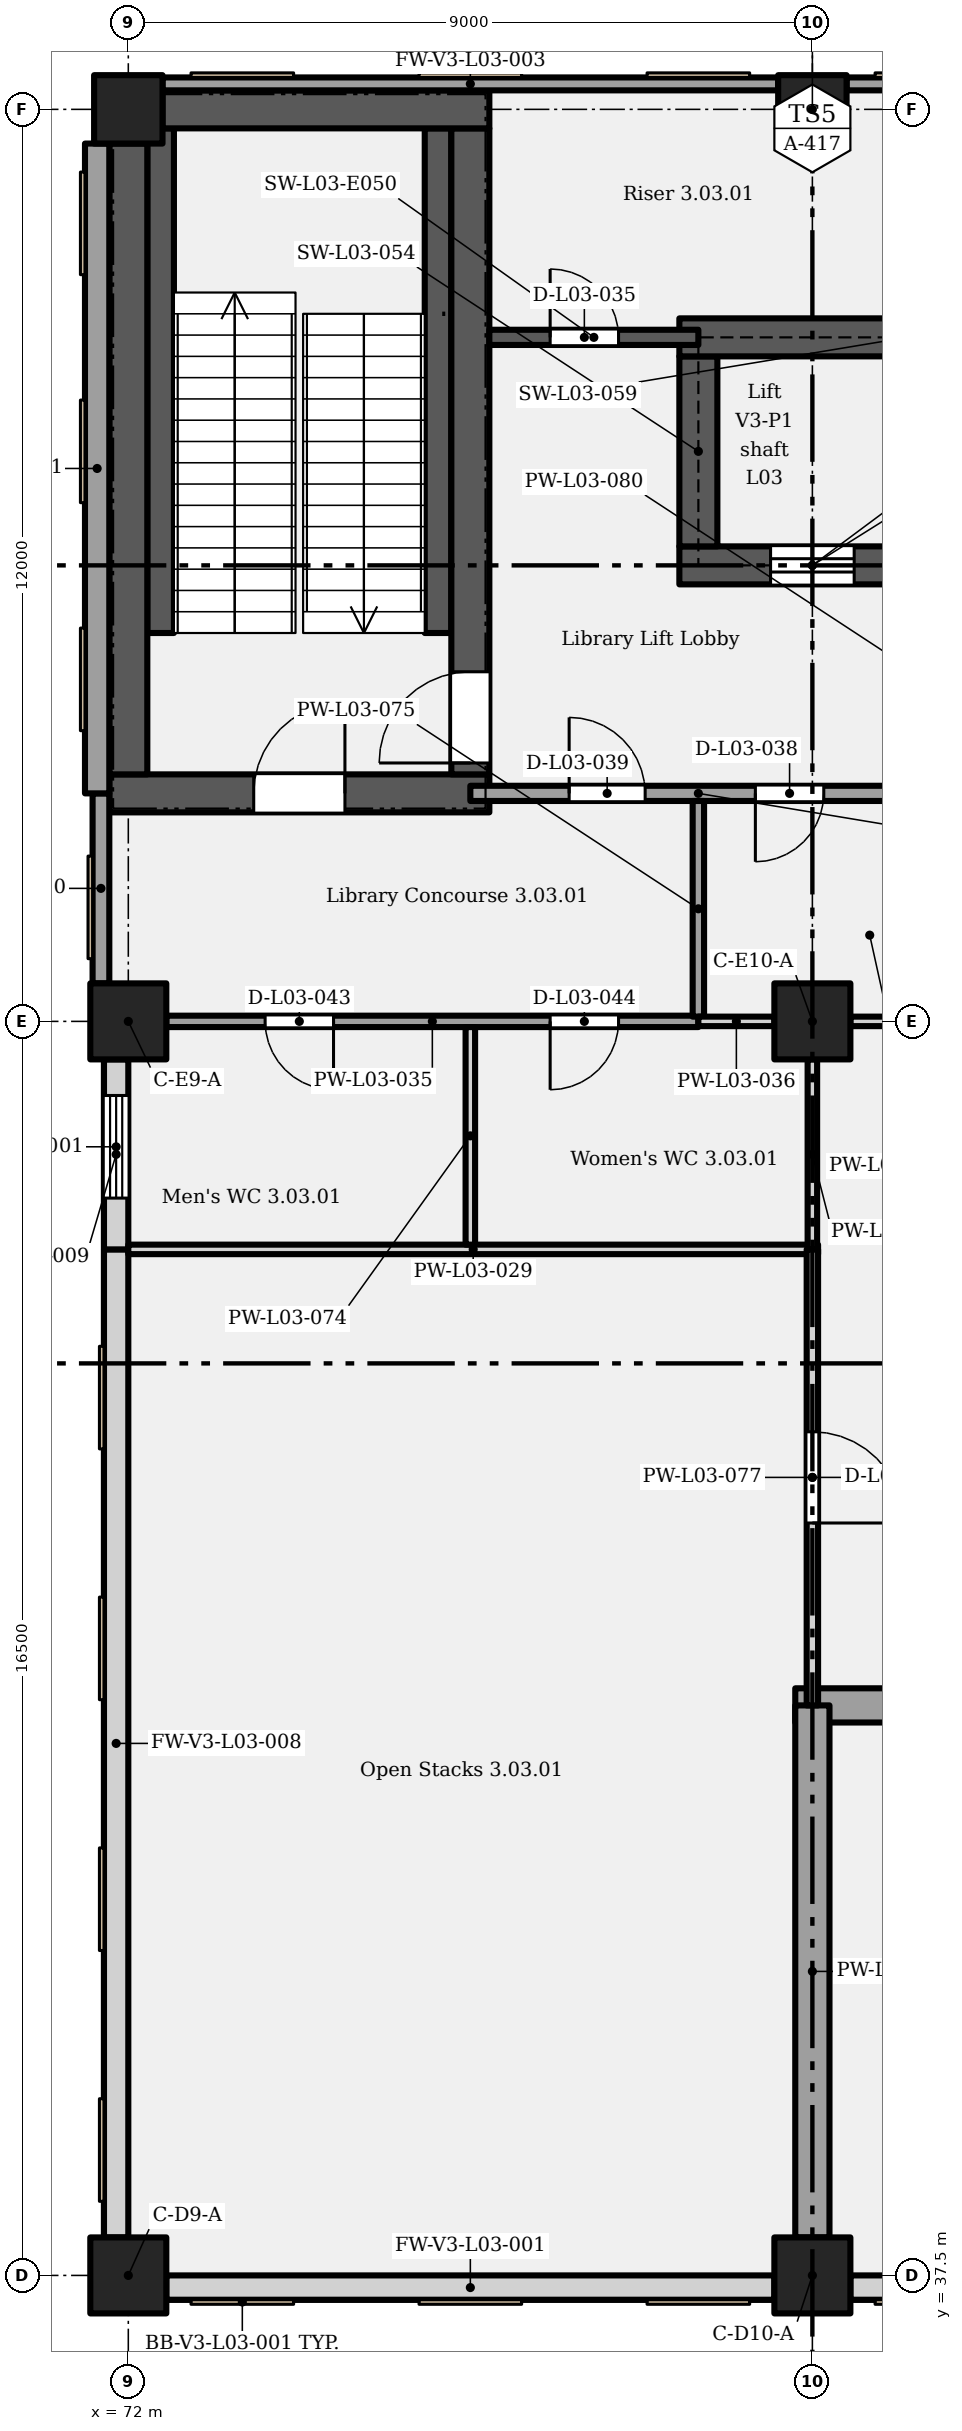
"""IFC4 building model, lengths in metres.
Left out: names, types, materials, properties, quantities, classifications, styles, units other than length and angle.
Written with IfcOpenShell. Run it as: python <this file> out.ifc"""

import sys

from ifc_helpers import new_model, si_unit, direction, frame, frame_2d, origin, origin_2d, place, context, subcontext, project, spatial, rectangle, extrude, element, fill, save


model = new_model("IFC4")
c1 = context("Model", 3, precision=1e-05, world=origin(), true_north=direction((0.0, 1.0)))
c2 = subcontext(c1, "Body", "Model", "MODEL_VIEW")
j1 = project(units=[si_unit("LENGTHUNIT", "METRE"), si_unit("PLANEANGLEUNIT", "RADIAN")], contexts=[c1])
p1 = place(None, origin())
s1 = spatial("IfcSite", under=j1, at=p1, CompositionType="ELEMENT")
p2 = place(p1, origin())
s2 = spatial("IfcBuilding", under=s1, at=p2, CompositionType="ELEMENT")
p3 = place(p2, frame((0.0, 0.0, 17.4)))
s3 = spatial("IfcBuildingStorey", under=s2, at=p3, CompositionType="ELEMENT", Elevation=17.4)
for number, where, z_axis, x_axis in (
    (1, (72.0, 37.5, 0.0), (0.0, 0.0, 1.0), (1.0, 0.0, 0.0)),
    (2, (81.0, 37.5, 0.0), (0.0, 0.0, 1.0), (1.0, 0.0, 0.0)),
    (3, (72.0, 54.0, 0.0), (0.0, 0.0, 1.0), (1.0, 0.0, 0.0)),
    (4, (81.0, 54.0, 0.0), (0.0, 0.0, 1.0), (1.0, 0.0, 0.0)),
):
    element("IfcColumn", number, at=place(p3, frame(where, z_axis=z_axis, x_axis=x_axis)), inside=s3, PredefinedType="COLUMN", context=c2, shape_type="SweptSolid", body=[
        extrude(rectangle(XDim=1.0, YDim=1.0, at=origin_2d()), origin(), (0.0, 0.0, 1.0), 5.4),
    ])
for number, where, z_axis, x_axis in (
    (5, (72.0, 66.0, 0.0), (0.0, 0.0, 1.0), (1.0, 0.0, 0.0)),
    (6, (81.0, 66.0, 0.0), (0.0, 0.0, 1.0), (1.0, 0.0, 0.0)),
):
    element("IfcColumn", number, at=place(p3, frame(where, z_axis=z_axis, x_axis=x_axis)), inside=s3, PredefinedType="COLUMN", context=c2, shape_type="SweptSolid", body=[
        extrude(rectangle(XDim=0.9, YDim=0.9, at=origin_2d()), origin(), (0.0, 0.0, 1.0), 5.4),
    ])
p4 = place(p3, frame((71.75, 57.0, 0.0), z_axis=(0.0, 0.0, 1.0), x_axis=(1.0, 0.0, 0.0)))
e7 = element("IfcWall", 7, at=p4, inside=s3, PredefinedType="SHEAR", context=c2, shape_type="SweptSolid", body=[
    extrude(rectangle(XDim=5.0, YDim=0.5, at=frame_2d((2.5, 0.0))), origin(), (0.0, 0.0, 1.0), 5.15),
])
p5 = place(p4, frame((1.9, 0.0, 0.0)))
e8 = element("IfcOpeningElement", 8, at=p5, cuts=e7, PredefinedType="OPENING", context=c2, shape_type="SweptSolid", body=[
    extrude(rectangle(XDim=1.2, YDim=2.1, at=frame_2d((0.6, 1.05))), frame((0.0, 0.26, 0.0), z_axis=(0.0, -1.0, 0.0), x_axis=(1.0, 0.0, 0.0)), (0.0, 0.0, 1.0), 0.52),
])
p6 = place(p3, frame((72.0, 57.25, 0.0), z_axis=(0.0, 0.0, 1.0), x_axis=(0.0, 1.0, 0.0)))
e9 = element("IfcWall", 9, at=p6, inside=s3, PredefinedType="SHEAR", context=c2, shape_type="SweptSolid", body=[
    extrude(rectangle(XDim=8.3, YDim=0.5, at=frame_2d((4.15, 0.0))), origin(), (0.0, 0.0, 1.0), 5.15),
])
p7 = place(p3, frame((76.5, 57.25, 0.0), z_axis=(0.0, 0.0, 1.0), x_axis=(0.0, 1.0, 0.0)))
e10 = element("IfcWall", 10, at=p7, inside=s3, PredefinedType="SHEAR", context=c2, shape_type="SweptSolid", body=[
    extrude(rectangle(XDim=8.5, YDim=0.5, at=frame_2d((4.25, 0.0))), origin(), (0.0, 0.0, 1.0), 5.15),
])
p8 = place(p7, frame((0.15, 0.0, 0.0)))
e11 = element("IfcOpeningElement", 11, at=p8, cuts=e10, PredefinedType="OPENING", context=c2, shape_type="SweptSolid", body=[
    extrude(rectangle(XDim=1.2, YDim=2.1, at=frame_2d((0.6, 1.05))), frame((0.0, 0.26, 0.0), z_axis=(0.0, -1.0, 0.0), x_axis=(1.0, 0.0, 0.0)), (0.0, 0.0, 1.0), 0.52),
])
p9 = place(p3, frame((79.25, 60.0, 0.0), z_axis=(0.0, 0.0, 1.0), x_axis=(1.0, 0.0, 0.0)))
e12 = element("IfcWall", 12, at=p9, inside=s3, PredefinedType="SHEAR", context=c2, shape_type="SweptSolid", body=[
    extrude(rectangle(XDim=3.5, YDim=0.5, at=frame_2d((1.75, 0.0))), origin(), (0.0, 0.0, 1.0), 5.15),
])
p10 = place(p9, frame((1.2, 0.0, 0.0)))
e13 = element("IfcOpeningElement", 13, at=p10, cuts=e12, PredefinedType="OPENING", context=c2, shape_type="SweptSolid", body=[
    extrude(rectangle(XDim=1.1, YDim=2.1, at=frame_2d((0.55, 1.05))), frame((0.0, 0.26, 0.0), z_axis=(0.0, -1.0, 0.0), x_axis=(1.0, 0.0, 0.0)), (0.0, 0.0, 1.0), 0.52),
])
p11 = place(p3, frame((79.5, 60.25, 0.0), z_axis=(0.0, 0.0, 1.0), x_axis=(0.0, 1.0, 0.0)))
e14 = element("IfcWall", 14, at=p11, inside=s3, PredefinedType="SHEAR", context=c2, shape_type="SweptSolid", body=[
    extrude(rectangle(XDim=2.5, YDim=0.5, at=frame_2d((1.25, 0.0))), origin(), (0.0, 0.0, 1.0), 5.15),
])
p12 = place(p3, frame((79.25, 63.0, 0.0), z_axis=(0.0, 0.0, 1.0), x_axis=(1.0, 0.0, 0.0)))
e15 = element("IfcWall", 15, at=p12, inside=s3, PredefinedType="SHEAR", context=c2, shape_type="SweptSolid", body=[
    extrude(rectangle(XDim=6.0, YDim=0.5, at=frame_2d((3.0, 0.0))), origin(), (0.0, 0.0, 1.0), 5.15),
])
p13 = place(p12, frame((4.2, 0.0, 0.0)))
e16 = element("IfcOpeningElement", 16, at=p13, cuts=e15, PredefinedType="OPENING", context=c2, shape_type="SweptSolid", body=[
    extrude(rectangle(XDim=1.1, YDim=2.1, at=frame_2d((0.55, 1.05))), frame((0.0, 0.26, 0.0), z_axis=(0.0, -1.0, 0.0), x_axis=(1.0, 0.0, 0.0)), (0.0, 0.0, 1.0), 0.52),
])
p14 = place(p3, frame((72.45, 66.0, 0.0), z_axis=(0.0, 0.0, 1.0), x_axis=(1.0, 0.0, 0.0)))
e17 = element("IfcWall", 17, at=p14, inside=s3, PredefinedType="SHEAR", context=c2, shape_type="SweptSolid", body=[
    extrude(rectangle(XDim=4.3, YDim=0.5, at=frame_2d((2.15, 0.0))), origin(), (0.0, 0.0, 1.0), 5.15),
])
p15 = place(p3, frame((72.5, 37.34, 0.0), z_axis=(0.0, 0.0, 1.0), x_axis=(1.0, 0.0, 0.0)))
e18 = element("IfcWall", 18, at=p15, inside=s3, PredefinedType="SOLIDWALL", context=c2, shape_type="SweptSolid", body=[
    extrude(rectangle(XDim=8.0, YDim=0.32, at=frame_2d((4.0, 0.0))), origin(), (0.0, 0.0, 1.0), 5.15),
])
p16 = place(p3, frame((81.5, 37.34, 0.0), z_axis=(0.0, 0.0, 1.0), x_axis=(1.0, 0.0, 0.0)))
e19 = element("IfcWall", 19, at=p16, inside=s3, PredefinedType="SOLIDWALL", context=c2, shape_type="SweptSolid", body=[
    extrude(rectangle(XDim=8.05, YDim=0.32, at=frame_2d((4.025, 0.0))), origin(), (0.0, 0.0, 1.0), 5.15),
])
for number, where, z_axis, x_axis in (
    (20, (72.45, 66.335, 0.0), (0.0, 0.0, 1.0), (1.0, 0.0, 0.0)),
    (21, (81.45, 66.335, 0.0), (0.0, 0.0, 1.0), (1.0, 0.0, 0.0)),
):
    element("IfcWall", number, at=place(p3, frame(where, z_axis=z_axis, x_axis=x_axis)), inside=s3, PredefinedType="SOLIDWALL", context=c2, shape_type="SweptSolid", body=[
        extrude(rectangle(XDim=8.1, YDim=0.17, at=frame_2d((4.05, 0.0))), origin(), (0.0, 0.0, 1.0), 5.15),
    ])
p17 = place(p3, frame((71.84, 38.0, 0.0), z_axis=(0.0, 0.0, 1.0), x_axis=(0.0, 1.0, 0.0)))
e22 = element("IfcWall", 22, at=p17, inside=s3, PredefinedType="SOLIDWALL", context=c2, shape_type="SweptSolid", body=[
    extrude(rectangle(XDim=13.0, YDim=0.32, at=frame_2d((6.5, 0.0))), origin(), (0.0, 0.0, 1.0), 5.15),
])
p18 = place(p3, frame((71.84, 51.0, 0.0), z_axis=(0.0, 0.0, 1.0), x_axis=(0.0, 1.0, 0.0)))
e23 = element("IfcWall", 23, at=p18, inside=s3, PredefinedType="SOLIDWALL", context=c2, shape_type="SweptSolid", body=[
    extrude(rectangle(XDim=2.5, YDim=0.32, at=frame_2d((1.25, 0.0))), origin(), (0.0, 0.0, 1.0), 5.15),
])
p19 = place(p18, frame((0.675, 0.0, 1.2)))
e24 = element("IfcOpeningElement", 24, at=p19, cuts=e23, PredefinedType="OPENING", context=c2, shape_type="SweptSolid", body=[
    extrude(rectangle(XDim=1.35, YDim=2.55, at=frame_2d((0.675, 1.275))), frame((0.0, 0.17, 0.0), z_axis=(0.0, -1.0, 0.0), x_axis=(1.0, 0.0, 0.0)), (0.0, 0.0, 1.0), 0.34),
])
p20 = place(p3, frame((71.64, 54.5, 0.0), z_axis=(0.0, 0.0, 1.0), x_axis=(0.0, 1.0, 0.0)))
e25 = element("IfcWall", 25, at=p20, inside=s3, PredefinedType="SOLIDWALL", context=c2, shape_type="SweptSolid", body=[
    extrude(rectangle(XDim=2.5, YDim=0.22, at=frame_2d((1.25, 0.0))), origin(), (0.0, 0.0, 1.0), 5.15),
])
p21 = place(p3, frame((71.59, 57.0, 0.0), z_axis=(0.0, 0.0, 1.0), x_axis=(0.0, 1.0, 0.0)))
e26 = element("IfcWall", 26, at=p21, inside=s3, PredefinedType="SOLIDWALL", context=c2, shape_type="SweptSolid", body=[
    extrude(rectangle(XDim=8.55, YDim=0.32, at=frame_2d((4.275, 0.0))), origin(), (0.0, 0.0, 1.0), 5.15),
])
p22 = place(p3, frame((80.775, 45.0, 0.0), z_axis=(0.0, 0.0, 1.0), x_axis=(1.0, 0.0, 0.0)))
e27 = element("IfcWall", 27, at=p22, inside=s3, PredefinedType="PARTITIONING", context=c2, shape_type="SweptSolid", body=[
    extrude(rectangle(XDim=9.225, YDim=0.45, at=frame_2d((4.613, 0.0))), origin(), (0.0, 0.0, 1.0), 5.15),
])
p23 = place(p22, frame((4.125, 0.0, 0.0)))
e28 = element("IfcOpeningElement", 28, at=p23, cuts=e27, PredefinedType="OPENING", context=c2, shape_type="SweptSolid", body=[
    extrude(rectangle(XDim=1.2, YDim=2.4, at=frame_2d((0.6, 1.2))), frame((0.0, 0.235, 0.0), z_axis=(0.0, -1.0, 0.0), x_axis=(1.0, 0.0, 0.0)), (0.0, 0.0, 1.0), 0.47),
])
p24 = place(p3, frame((72.0, 51.0, 0.0), z_axis=(0.0, 0.0, 1.0), x_axis=(1.0, 0.0, 0.0)))
e29 = element("IfcWall", 29, at=p24, inside=s3, PredefinedType="PARTITIONING", context=c2, shape_type="SweptSolid", body=[
    extrude(rectangle(XDim=9.075, YDim=0.125, at=frame_2d((4.538, 0.0))), origin(), (0.0, 0.0, 1.0), 5.15),
])
p25 = place(p3, frame((72.5, 54.0, 0.0), z_axis=(0.0, 0.0, 1.0), x_axis=(1.0, 0.0, 0.0)))
e30 = element("IfcWall", 30, at=p25, inside=s3, PredefinedType="PARTITIONING", context=c2, shape_type="SweptSolid", body=[
    extrude(rectangle(XDim=7.0, YDim=0.15, at=frame_2d((3.5, 0.0))), origin(), (0.0, 0.0, 1.0), 4.4),
])
p26 = place(p25, frame((2.2, 0.0, 0.0), z_axis=(0.0, 0.0, 1.0), x_axis=(-1.0, 0.0, 0.0)))
e31 = element("IfcOpeningElement", 31, at=p26, cuts=e30, PredefinedType="OPENING", context=c2, shape_type="SweptSolid", body=[
    extrude(rectangle(XDim=0.9, YDim=2.1, at=frame_2d((0.45, 1.05))), frame((0.0, 0.085, 0.0), z_axis=(0.0, -1.0, 0.0), x_axis=(1.0, 0.0, 0.0)), (0.0, 0.0, 1.0), 0.17),
])
p27 = place(p25, frame((5.95, 0.0, 0.0), z_axis=(0.0, 0.0, 1.0), x_axis=(-1.0, 0.0, 0.0)))
e32 = element("IfcOpeningElement", 32, at=p27, cuts=e30, PredefinedType="OPENING", context=c2, shape_type="SweptSolid", body=[
    extrude(rectangle(XDim=0.9, YDim=2.1, at=frame_2d((0.45, 1.05))), frame((0.0, 0.085, 0.0), z_axis=(0.0, -1.0, 0.0), x_axis=(1.0, 0.0, 0.0)), (0.0, 0.0, 1.0), 0.17),
])
for number, where, z_axis, x_axis in (
    (33, (79.5, 54.0, 0.0), (0.0, 0.0, 1.0), (1.0, 0.0, 0.0)),
    (34, (81.5, 54.0, 0.0), (0.0, 0.0, 1.0), (1.0, 0.0, 0.0)),
):
    element("IfcWall", number, at=place(p3, frame(where, z_axis=z_axis, x_axis=x_axis)), inside=s3, PredefinedType="PARTITIONING", context=c2, shape_type="SweptSolid", body=[
        extrude(rectangle(XDim=1.0, YDim=0.125, at=frame_2d((0.5, 0.0))), origin(), (0.0, 0.0, 1.0), 4.4),
    ])
p28 = place(p3, frame((76.5, 57.0, 0.0), z_axis=(0.0, 0.0, 1.0), x_axis=(1.0, 0.0, 0.0)))
e35 = element("IfcWall", 35, at=p28, inside=s3, PredefinedType="PARTITIONING", context=c2, shape_type="SweptSolid", body=[
    extrude(rectangle(XDim=6.0, YDim=0.2, at=frame_2d((3.0, 0.0))), origin(), (0.0, 0.0, 1.0), 5.15),
])
p29 = place(p28, frame((4.65, 0.0, 0.0), z_axis=(0.0, 0.0, 1.0), x_axis=(-1.0, 0.0, 0.0)))
e36 = element("IfcOpeningElement", 36, at=p29, cuts=e35, PredefinedType="OPENING", context=c2, shape_type="SweptSolid", body=[
    extrude(rectangle(XDim=0.9, YDim=2.1, at=frame_2d((0.45, 1.05))), frame((0.0, 0.11, 0.0), z_axis=(0.0, -1.0, 0.0), x_axis=(1.0, 0.0, 0.0)), (0.0, 0.0, 1.0), 0.22),
])
p30 = place(p28, frame((1.3, 0.0, 0.0)))
e37 = element("IfcOpeningElement", 37, at=p30, cuts=e35, PredefinedType="OPENING", context=c2, shape_type="SweptSolid", body=[
    extrude(rectangle(XDim=1.0, YDim=2.1, at=frame_2d((0.5, 1.05))), frame((0.0, 0.11, 0.0), z_axis=(0.0, -1.0, 0.0), x_axis=(1.0, 0.0, 0.0)), (0.0, 0.0, 1.0), 0.22),
])
p31 = place(p3, frame((76.75, 63.0, 0.0), z_axis=(0.0, 0.0, 1.0), x_axis=(1.0, 0.0, 0.0)))
e38 = element("IfcWall", 38, at=p31, inside=s3, PredefinedType="SHEAR", context=c2, shape_type="SweptSolid", body=[
    extrude(rectangle(XDim=2.75, YDim=0.2, at=frame_2d((1.375, 0.0))), origin(), (0.0, 0.0, 1.0), 5.15),
])
p32 = place(p31, frame((0.8, 0.0, 0.0)))
e39 = element("IfcOpeningElement", 39, at=p32, cuts=e38, PredefinedType="OPENING", context=c2, shape_type="SweptSolid", body=[
    extrude(rectangle(XDim=0.9, YDim=2.0, at=frame_2d((0.45, 1.0))), frame((0.0, 0.11, 0.0), z_axis=(0.0, -1.0, 0.0), x_axis=(1.0, 0.0, 0.0)), (0.0, 0.0, 1.0), 0.22),
])
p33 = place(p3, frame((76.5, 51.062, 0.0), z_axis=(0.0, 0.0, 1.0), x_axis=(0.0, 1.0, 0.0)))
e40 = element("IfcWall", 40, at=p33, inside=s3, PredefinedType="PARTITIONING", context=c2, shape_type="SweptSolid", body=[
    extrude(rectangle(XDim=2.863, YDim=0.125, at=frame_2d((1.431, 0.0))), origin(), (0.0, 0.0, 1.0), 5.15),
])
p34 = place(p3, frame((79.5, 54.062, 0.0), z_axis=(0.0, 0.0, 1.0), x_axis=(0.0, 1.0, 0.0)))
e41 = element("IfcWall", 41, at=p34, inside=s3, PredefinedType="PARTITIONING", context=c2, shape_type="SweptSolid", body=[
    extrude(rectangle(XDim=2.837, YDim=0.15, at=frame_2d((1.419, 0.0))), origin(), (0.0, 0.0, 1.0), 5.15),
])
p35 = place(p3, frame((81.0, 38.0, 0.0), z_axis=(0.0, 0.0, 1.0), x_axis=(0.0, 1.0, 0.0)))
e42 = element("IfcWall", 42, at=p35, inside=s3, PredefinedType="PARTITIONING", context=c2, shape_type="SweptSolid", body=[
    extrude(rectangle(XDim=7.0, YDim=0.45, at=frame_2d((3.5, 0.0))), origin(), (0.0, 0.0, 1.0), 4.2),
])
p36 = place(p3, frame((81.0, 45.0, 0.0), z_axis=(0.0, 0.0, 1.0), x_axis=(0.0, 1.0, 0.0)))
e43 = element("IfcWall", 43, at=p36, inside=s3, PredefinedType="PARTITIONING", context=c2, shape_type="SweptSolid", body=[
    extrude(rectangle(XDim=6.0, YDim=0.15, at=frame_2d((3.0, 0.0))), origin(), (0.0, 0.0, 1.0), 4.2),
])
p37 = place(p36, frame((3.6, 0.0, 0.0), z_axis=(0.0, 0.0, 1.0), x_axis=(-1.0, 0.0, 0.0)))
e44 = element("IfcOpeningElement", 44, at=p37, cuts=e43, PredefinedType="OPENING", context=c2, shape_type="SweptSolid", body=[
    extrude(rectangle(XDim=1.2, YDim=2.4, at=frame_2d((0.6, 1.2))), frame((0.0, 0.085, 0.0), z_axis=(0.0, -1.0, 0.0), x_axis=(1.0, 0.0, 0.0)), (0.0, 0.0, 1.0), 0.17),
])
p38 = place(p3, frame((81.0, 51.0, 0.0), z_axis=(0.0, 0.0, 1.0), x_axis=(0.0, 1.0, 0.0)))
e45 = element("IfcWall", 45, at=p38, inside=s3, PredefinedType="PARTITIONING", context=c2, shape_type="SweptSolid", body=[
    extrude(rectangle(XDim=2.5, YDim=0.125, at=frame_2d((1.25, 0.0))), origin(), (0.0, 0.0, 1.0), 4.2),
])
p39 = place(p3, frame((72.425, 59.11, 0.0), z_axis=(0.0, 0.0, 1.0), x_axis=(0.0, 1.0, 0.0)))
e46 = element("IfcWall", 46, at=p39, inside=s3, PredefinedType="SHEAR", context=c2, shape_type="SweptSolid", body=[
    extrude(rectangle(XDim=6.64, YDim=0.35, at=frame_2d((3.32, 0.0))), origin(), (0.0, 0.0, 1.0), 5.15),
])
p40 = place(p3, frame((76.075, 59.11, 0.0), z_axis=(0.0, 0.0, 1.0), x_axis=(0.0, 1.0, 0.0)))
e47 = element("IfcWall", 47, at=p40, inside=s3, PredefinedType="SHEAR", context=c2, shape_type="SweptSolid", body=[
    extrude(rectangle(XDim=6.64, YDim=0.35, at=frame_2d((3.32, 0.0))), origin(), (0.0, 0.0, 1.0), 2.587),
])
p41 = place(p19, origin())
e48 = element("IfcWindow", 48, at=p41, inside=s3, PartitioningType="SINGLE_PANEL", PredefinedType="WINDOW", context=c2, shape_type="SweptSolid", body=[
    extrude(rectangle(XDim=1.35, YDim=2.55, at=frame_2d((0.675, 1.275))), frame((0.0, 0.03, 0.0), z_axis=(0.0, -1.0, 0.0), x_axis=(1.0, 0.0, 0.0)), (0.0, 0.0, 1.0), 0.06),
])
fill(e24, e48)
p42 = place(p8, origin())
e49 = element("IfcDoor", 49, at=p42, inside=s3, OperationType="SINGLE_SWING_LEFT", PredefinedType="DOOR", context=c2, shape_type="SweptSolid", body=[
    extrude(rectangle(XDim=1.2, YDim=2.1, at=frame_2d((0.6, 1.05))), frame((0.0, 0.025, 0.0), z_axis=(0.0, -1.0, 0.0), x_axis=(1.0, 0.0, 0.0)), (0.0, 0.0, 1.0), 0.05),
])
fill(e11, e49)
p43 = place(p10, origin())
e50 = element("IfcDoor", 50, at=p43, inside=s3, OperationType="SLIDING_TO_LEFT", PredefinedType="DOOR", context=c2, shape_type="SweptSolid", body=[
    extrude(rectangle(XDim=1.1, YDim=2.1, at=frame_2d((0.55, 1.05))), frame((0.0, 0.025, 0.0), z_axis=(0.0, -1.0, 0.0), x_axis=(1.0, 0.0, 0.0)), (0.0, 0.0, 1.0), 0.05),
])
fill(e13, e50)
p44 = place(p32, origin())
e51 = element("IfcDoor", 51, at=p44, inside=s3, OperationType="SINGLE_SWING_LEFT", PredefinedType="DOOR", context=c2, shape_type="SweptSolid", body=[
    extrude(rectangle(XDim=0.9, YDim=2.0, at=frame_2d((0.45, 1.0))), frame((0.0, 0.025, 0.0), z_axis=(0.0, -1.0, 0.0), x_axis=(1.0, 0.0, 0.0)), (0.0, 0.0, 1.0), 0.05),
])
fill(e39, e51)
p45 = place(p29, origin())
e52 = element("IfcDoor", 52, at=p45, inside=s3, OperationType="SINGLE_SWING_RIGHT", PredefinedType="DOOR", context=c2, shape_type="SweptSolid", body=[
    extrude(rectangle(XDim=0.9, YDim=2.1, at=frame_2d((0.45, 1.05))), frame((0.0, 0.025, 0.0), z_axis=(0.0, -1.0, 0.0), x_axis=(1.0, 0.0, 0.0)), (0.0, 0.0, 1.0), 0.05),
])
fill(e36, e52)
p46 = place(p30, origin())
e53 = element("IfcDoor", 53, at=p46, inside=s3, OperationType="SINGLE_SWING_LEFT", PredefinedType="DOOR", context=c2, shape_type="SweptSolid", body=[
    extrude(rectangle(XDim=1.0, YDim=2.1, at=frame_2d((0.5, 1.05))), frame((0.0, 0.025, 0.0), z_axis=(0.0, -1.0, 0.0), x_axis=(1.0, 0.0, 0.0)), (0.0, 0.0, 1.0), 0.05),
])
fill(e37, e53)
p47 = place(p5, origin())
e54 = element("IfcDoor", 54, at=p47, inside=s3, OperationType="SINGLE_SWING_RIGHT", PredefinedType="DOOR", context=c2, shape_type="SweptSolid", body=[
    extrude(rectangle(XDim=1.2, YDim=2.1, at=frame_2d((0.6, 1.05))), frame((0.0, 0.025, 0.0), z_axis=(0.0, -1.0, 0.0), x_axis=(1.0, 0.0, 0.0)), (0.0, 0.0, 1.0), 0.05),
])
fill(e8, e54)
p48 = place(p26, origin())
e55 = element("IfcDoor", 55, at=p48, inside=s3, OperationType="SINGLE_SWING_LEFT", PredefinedType="DOOR", context=c2, shape_type="SweptSolid", body=[
    extrude(rectangle(XDim=0.9, YDim=2.1, at=frame_2d((0.45, 1.05))), frame((0.0, 0.025, 0.0), z_axis=(0.0, -1.0, 0.0), x_axis=(1.0, 0.0, 0.0)), (0.0, 0.0, 1.0), 0.05),
])
fill(e31, e55)
p49 = place(p27, origin())
e56 = element("IfcDoor", 56, at=p49, inside=s3, OperationType="SINGLE_SWING_RIGHT", PredefinedType="DOOR", context=c2, shape_type="SweptSolid", body=[
    extrude(rectangle(XDim=0.9, YDim=2.1, at=frame_2d((0.45, 1.05))), frame((0.0, 0.025, 0.0), z_axis=(0.0, -1.0, 0.0), x_axis=(1.0, 0.0, 0.0)), (0.0, 0.0, 1.0), 0.05),
])
fill(e32, e56)
p50 = place(p37, origin())
e57 = element("IfcDoor", 57, at=p50, inside=s3, OperationType="SINGLE_SWING_RIGHT", PredefinedType="DOOR", context=c2, shape_type="SweptSolid", body=[
    extrude(rectangle(XDim=1.2, YDim=2.4, at=frame_2d((0.6, 1.2))), frame((0.0, 0.025, 0.0), z_axis=(0.0, -1.0, 0.0), x_axis=(1.0, 0.0, 0.0)), (0.0, 0.0, 1.0), 0.05),
])
fill(e44, e57)
save(model, sys.argv[1])
